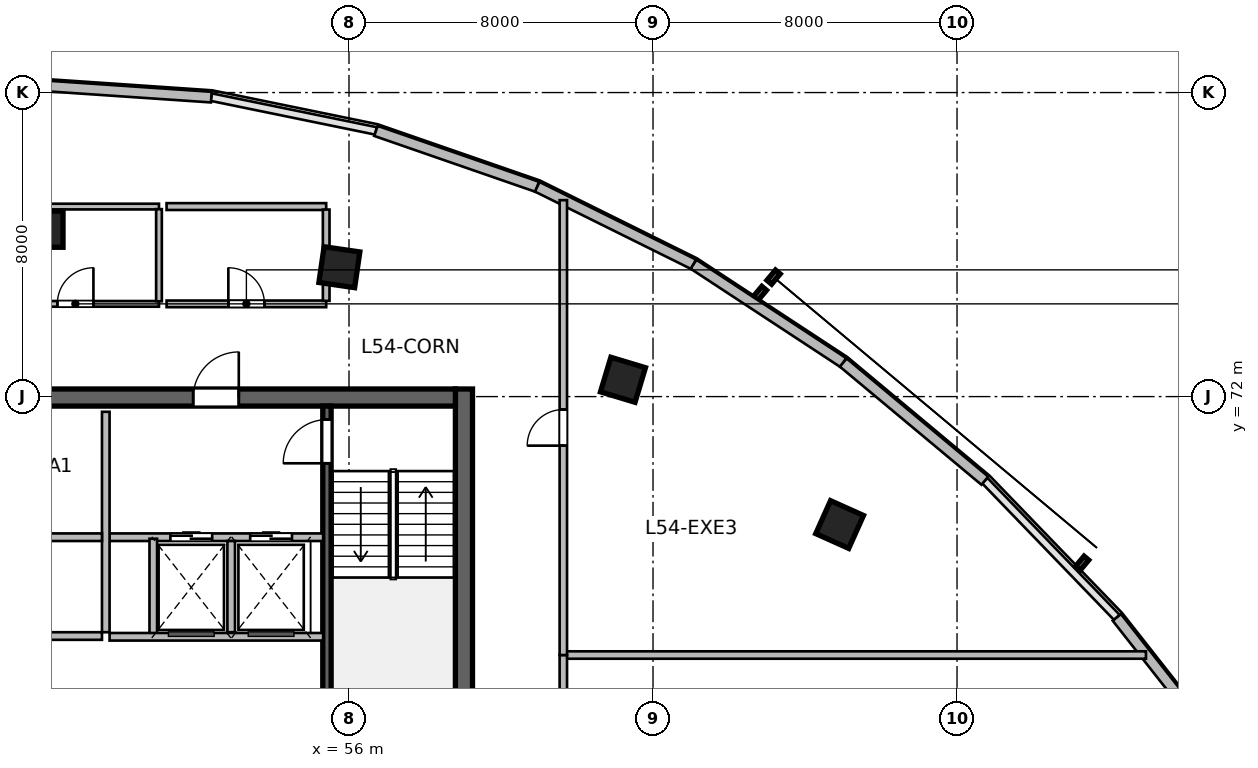
"""IFC4 building model, lengths in metres.
Left out: names, types, materials, properties, quantities, classifications, styles, units other than length and angle.
Written with IfcOpenShell. Run it as: python <this file> out.ifc"""

import sys

from ifc_helpers import new_model, si_unit, direction, frame, frame_2d, origin, origin_2d, place, context, subcontext, project, spatial, rectangle, extrude, source, transform, mapped, element, fill, save


model = new_model("IFC4")
c1 = context("Model", 3, precision=1e-05, world=origin(), true_north=direction((0.0, 1.0)))
c2 = subcontext(c1, "Body", "Model", "MODEL_VIEW")
j1 = project(units=[si_unit("LENGTHUNIT", "METRE"), si_unit("PLANEANGLEUNIT", "RADIAN")], contexts=[c1])
p1 = place(None, origin())
s1 = spatial("IfcSite", under=j1, at=p1, CompositionType="ELEMENT")
p2 = place(p1, origin())
s2 = spatial("IfcBuilding", under=s1, at=p2, CompositionType="ELEMENT")
p3 = place(p2, frame((0.0, 0.0, 223.5)))
s3 = spatial("IfcBuildingStorey", under=s2, at=p3, CompositionType="ELEMENT", Elevation=223.5)
m1 = source(origin(), c2, "Body", "SweptSolid", [
    extrude(rectangle(XDim=12.0, YDim=0.45, at=frame_2d((6.0, 0.0))), origin(), (0.0, 0.0, 1.0), 3.9),
])
p4 = place(p3, frame((59.025, 60.2, 0.0), z_axis=(0.0, 0.0, 1.0), x_axis=(0.0, 1.0, 0.0)))
e1 = element("IfcWall", 1, at=p4, inside=s3, PredefinedType="SHEAR", context=c2, shape_type="MappedRepresentation", body=[
    mapped(m1, transform((0.0, 0.0, 0.0), scale=1.0)),
])
m2 = source(origin(), c2, "Body", "SweptSolid", [
    extrude(rectangle(XDim=21.6, YDim=0.45, at=frame_2d((10.8, 0.0))), origin(), (0.0, 0.0, 1.0), 3.9),
])
p5 = place(p3, frame((37.2, 71.975, 0.0), z_axis=(0.0, 0.0, 1.0), x_axis=(1.0, 0.0, 0.0)))
e2 = element("IfcWall", 2, at=p5, inside=s3, PredefinedType="SHEAR", context=c2, shape_type="MappedRepresentation", body=[
    mapped(m2, transform((0.0, 0.0, 0.0), scale=1.0)),
])
p6 = place(p5, frame((1.2, 0.0, 0.0)))
e3 = element("IfcOpeningElement", 3, at=p6, cuts=e2, PredefinedType="OPENING", context=c2, shape_type="SweptSolid", body=[
    extrude(rectangle(XDim=0.9, YDim=2.1, at=frame_2d((0.45, 1.05))), frame((0.0, 0.235, 0.0), z_axis=(0.0, -1.0, 0.0), x_axis=(1.0, 0.0, 0.0)), (0.0, 0.0, 1.0), 0.47),
])
p7 = place(p5, frame((14.7, 0.0, 0.0)))
e4 = element("IfcOpeningElement", 4, at=p7, cuts=e2, PredefinedType="OPENING", context=c2, shape_type="SweptSolid", body=[
    extrude(rectangle(XDim=1.2, YDim=2.15, at=frame_2d((0.6, 1.075))), frame((0.0, 0.235, 0.0), z_axis=(0.0, -1.0, 0.0), x_axis=(1.0, 0.0, 0.0)), (0.0, 0.0, 1.0), 0.47),
])
p8 = place(p5, frame((4.15, 0.0, 0.0)))
e5 = element("IfcOpeningElement", 5, at=p8, cuts=e2, PredefinedType="OPENING", context=c2, shape_type="SweptSolid", body=[
    extrude(rectangle(XDim=1.3, YDim=2.15, at=frame_2d((0.65, 1.075))), frame((0.0, 0.235, 0.0), z_axis=(0.0, -1.0, 0.0), x_axis=(1.0, 0.0, 0.0)), (0.0, 0.0, 1.0), 0.47),
])
p9 = place(p5, frame((7.1, 0.0, 0.0)))
e6 = element("IfcOpeningElement", 6, at=p9, cuts=e2, PredefinedType="OPENING", context=c2, shape_type="SweptSolid", body=[
    extrude(rectangle(XDim=0.9, YDim=2.1, at=frame_2d((0.45, 1.05))), frame((0.0, 0.235, 0.0), z_axis=(0.0, -1.0, 0.0), x_axis=(1.0, 0.0, 0.0)), (0.0, 0.0, 1.0), 0.47),
])
m3 = source(origin(), c2, "Body", "SweptSolid", [
    extrude(rectangle(XDim=11.1, YDim=0.22, at=frame_2d((5.55, 0.0))), origin(), (0.0, 0.0, 1.0), 3.9),
])
p10 = place(p3, frame((55.42, 60.65, 0.0), z_axis=(0.0, 0.0, 1.0), x_axis=(0.0, 1.0, 0.0)))
e7 = element("IfcWall", 7, at=p10, inside=s3, PredefinedType="SHEAR", context=c2, shape_type="MappedRepresentation", body=[
    mapped(m3, transform((0.0, 0.0, 0.0), scale=1.0)),
])
p11 = place(p10, frame((9.595, 0.0, 0.0)))
e8 = element("IfcOpeningElement", 8, at=p11, cuts=e7, PredefinedType="OPENING", context=c2, shape_type="SweptSolid", body=[
    extrude(rectangle(XDim=1.15, YDim=2.15, at=frame_2d((0.575, 1.075))), frame((0.0, 0.12, 0.0), z_axis=(0.0, -1.0, 0.0), x_axis=(1.0, 0.0, 0.0)), (0.0, 0.0, 1.0), 0.24),
])
m4 = source(origin(), c2, "Body", "SweptSolid", [
    extrude(rectangle(XDim=0.95, YDim=0.95, at=origin_2d()), origin(), (0.0, 0.0, 1.0), 3.9),
])
for number, where, z_axis, x_axis in (
    (9, (48.0, 76.404, 0.0), (0.0, 0.0, 1.0), (0.0, 1.0, 0.0)),
    (10, (55.747, 75.404, 0.0), (0.0, 0.0, 1.0), (0.143, 0.99, 0.0)),
    (11, (63.209, 72.442, 0.0), (0.0, 0.0, 1.0), (0.289, 0.957, 0.0)),
    (12, (68.91, 68.633, 0.0), (0.0, 0.0, 1.0), (0.409, 0.912, 0.0)),
):
    element("IfcColumn", number, at=place(p3, frame(where, z_axis=z_axis, x_axis=x_axis)), inside=s3, PredefinedType="COLUMN", context=c2, shape_type="MappedRepresentation", body=[
        mapped(m4, transform((0.0, 0.0, 0.0), scale=1.0)),
    ])
m5 = source(origin(), c2, "Body", "SweptSolid", [
    extrude(rectangle(XDim=4.387, YDim=0.28, at=frame_2d((2.193, 0.0))), origin(), (0.0, 0.0, 1.0), 3.64),
])
p12 = place(p3, frame((48.0, 80.177, 0.0), z_axis=(0.0, 0.0, 1.0), x_axis=(0.997703650546, -0.06773053733, 0.0)))
e13 = element("IfcWall", 13, at=p12, inside=s3, PredefinedType="SOLIDWALL", context=c2, shape_type="MappedRepresentation", body=[
    mapped(m5, transform((0.0, 0.0, 0.0), scale=1.0)),
])
m6 = source(origin(), c2, "Body", "SweptSolid", [
    extrude(rectangle(XDim=4.492, YDim=0.28, at=frame_2d((2.246, 0.0))), origin(), (0.0, 0.0, 1.0), 3.64),
])
p13 = place(p3, frame((56.709, 78.991, 0.0), z_axis=(0.0, 0.0, 1.0), x_axis=(0.944872297412, -0.32743906545, 0.0)))
e14 = element("IfcWall", 14, at=p13, inside=s3, PredefinedType="SOLIDWALL", context=c2, shape_type="MappedRepresentation", body=[
    mapped(m6, transform((0.0, 0.0, 0.0), scale=1.0)),
])
m7 = source(origin(), c2, "Body", "SweptSolid", [
    extrude(rectangle(XDim=4.59, YDim=0.28, at=frame_2d((2.295, 0.0))), origin(), (0.0, 0.0, 1.0), 3.64),
])
p14 = place(p3, frame((60.954, 77.52, 0.0), z_axis=(0.0, 0.0, 1.0), x_axis=(0.895974834987, -0.444104824418, 0.0)))
e15 = element("IfcWall", 15, at=p14, inside=s3, PredefinedType="SOLIDWALL", context=c2, shape_type="MappedRepresentation", body=[
    mapped(m7, transform((0.0, 0.0, 0.0), scale=1.0)),
])
m8 = source(origin(), c2, "Body", "SweptSolid", [
    extrude(rectangle(XDim=4.713, YDim=0.28, at=frame_2d((2.356, 0.0))), origin(), (0.0, 0.0, 1.0), 3.64),
])
p15 = place(p3, frame((65.066, 75.482, 0.0), z_axis=(0.0, 0.0, 1.0), x_axis=(0.835974386457, -0.548768462275, 0.0)))
e16 = element("IfcWall", 16, at=p15, inside=s3, PredefinedType="SOLIDWALL", context=c2, shape_type="MappedRepresentation", body=[
    mapped(m8, transform((0.0, 0.0, 0.0), scale=1.0)),
])
m9 = source(origin(), c2, "Body", "SweptSolid", [
    extrude(rectangle(XDim=4.852, YDim=0.28, at=frame_2d((2.426, 0.0))), origin(), (0.0, 0.0, 1.0), 3.64),
])
p16 = place(p3, frame((69.006, 72.896, 0.0), z_axis=(0.0, 0.0, 1.0), x_axis=(0.767936605821, -0.640525853843, 0.0)))
e17 = element("IfcWall", 17, at=p16, inside=s3, PredefinedType="SOLIDWALL", context=c2, shape_type="MappedRepresentation", body=[
    mapped(m9, transform((0.0, 0.0, 0.0), scale=1.0)),
])
m10 = source(origin(), c2, "Body", "SweptSolid", [
    extrude(rectangle(XDim=5.153, YDim=0.28, at=frame_2d((2.577, 0.0))), origin(), (0.0, 0.0, 1.0), 3.64),
])
p17 = place(p3, frame((76.205, 66.19, 0.0), z_axis=(0.0, 0.0, 1.0), x_axis=(0.618179283891, -0.786037132054, 0.0)))
e18 = element("IfcWall", 18, at=p17, inside=s3, PredefinedType="SOLIDWALL", context=c2, shape_type="MappedRepresentation", body=[
    mapped(m10, transform((0.0, 0.0, 0.0), scale=1.0)),
])
m11 = source(origin(), c2, "Body", "SweptSolid", [
    extrude(rectangle(XDim=5.62, YDim=0.2, at=frame_2d((2.81, 0.0))), origin(), (0.0, 0.0, 1.0), 3.64),
])
p18 = place(p3, frame((49.7, 68.3, 0.0), z_axis=(0.0, 0.0, 1.0), x_axis=(1.0, 0.0, 0.0)))
e19 = element("IfcWall", 19, at=p18, inside=s3, PredefinedType="SOLIDWALL", context=c2, shape_type="MappedRepresentation", body=[
    mapped(m11, transform((0.0, 0.0, 0.0), scale=1.0)),
])
p19 = place(p18, frame((1.6, 0.0, 0.0)))
e20 = element("IfcOpeningElement", 20, at=p19, cuts=e19, PredefinedType="OPENING", context=c2, shape_type="SweptSolid", body=[
    extrude(rectangle(XDim=1.1, YDim=2.15, at=frame_2d((0.55, 1.075))), frame((0.0, 0.11, 0.0), z_axis=(0.0, -1.0, 0.0), x_axis=(1.0, 0.0, 0.0)), (0.0, 0.0, 1.0), 0.22),
])
p20 = place(p18, frame((3.7, 0.0, 0.0)))
e21 = element("IfcOpeningElement", 21, at=p20, cuts=e19, PredefinedType="OPENING", context=c2, shape_type="SweptSolid", body=[
    extrude(rectangle(XDim=1.1, YDim=2.15, at=frame_2d((0.55, 1.075))), frame((0.0, 0.11, 0.0), z_axis=(0.0, -1.0, 0.0), x_axis=(1.0, 0.0, 0.0)), (0.0, 0.0, 1.0), 0.22),
])
m12 = source(origin(), c2, "Body", "SweptSolid", [
    extrude(rectangle(XDim=5.8, YDim=0.2, at=frame_2d((2.9, 0.0))), origin(), (0.0, 0.0, 1.0), 3.64),
])
p21 = place(p3, frame((49.6, 65.8, 0.0), z_axis=(0.0, 0.0, 1.0), x_axis=(0.0, 1.0, 0.0)))
e22 = element("IfcWall", 22, at=p21, inside=s3, PredefinedType="SOLIDWALL", context=c2, shape_type="MappedRepresentation", body=[
    mapped(m12, transform((0.0, 0.0, 0.0), scale=1.0)),
])
m13 = source(origin(), c2, "Body", "SweptSolid", [
    extrude(rectangle(XDim=2.58, YDim=0.2, at=frame_2d((1.29, 0.0))), origin(), (0.0, 0.0, 1.0), 3.64),
])
p22 = place(p3, frame((50.85, 65.68, 0.0), z_axis=(0.0, 0.0, 1.0), x_axis=(0.0, 1.0, 0.0)))
e23 = element("IfcWall", 23, at=p22, inside=s3, PredefinedType="SOLIDWALL", context=c2, shape_type="MappedRepresentation", body=[
    mapped(m13, transform((0.0, 0.0, 0.0), scale=1.0)),
])
m14 = source(origin(), c2, "Body", "SweptSolid", [
    extrude(rectangle(XDim=2.4, YDim=0.2, at=frame_2d((1.2, 0.0))), origin(), (0.0, 0.0, 1.0), 3.64),
])
p23 = place(p3, frame((52.9, 65.8, 0.0), z_axis=(0.0, 0.0, 1.0), x_axis=(0.0, 1.0, 0.0)))
e24 = element("IfcWall", 24, at=p23, inside=s3, PredefinedType="SOLIDWALL", context=c2, shape_type="MappedRepresentation", body=[
    mapped(m14, transform((0.0, 0.0, 0.0), scale=1.0)),
])
p24 = place(p3, frame((49.7, 65.68, 0.0), z_axis=(0.0, 0.0, 1.0), x_axis=(1.0, 0.0, 0.0)))
e25 = element("IfcWall", 25, at=p24, inside=s3, PredefinedType="SOLIDWALL", context=c2, shape_type="MappedRepresentation", body=[
    mapped(m11, transform((0.0, 0.0, 0.0), scale=1.0)),
])
m15 = source(origin(), c2, "Body", "SweptSolid", [
    extrude(rectangle(XDim=8.8, YDim=0.2, at=frame_2d((4.4, 0.0))), origin(), (0.0, 0.0, 1.0), 3.64),
])
p25 = place(p3, frame((40.7, 68.3, 0.0), z_axis=(0.0, 0.0, 1.0), x_axis=(1.0, 0.0, 0.0)))
e26 = element("IfcWall", 26, at=p25, inside=s3, PredefinedType="SOLIDWALL", context=c2, shape_type="MappedRepresentation", body=[
    mapped(m15, transform((0.0, 0.0, 0.0), scale=1.0)),
])
p26 = place(p3, frame((40.7, 65.7, 0.0), z_axis=(0.0, 0.0, 1.0), x_axis=(1.0, 0.0, 0.0)))
e27 = element("IfcWall", 27, at=p26, inside=s3, PredefinedType="SOLIDWALL", context=c2, shape_type="MappedRepresentation", body=[
    mapped(m15, transform((0.0, 0.0, 0.0), scale=1.0)),
])
p27 = place(p26, frame((3.8, 0.0, 0.0)))
e28 = element("IfcOpeningElement", 28, at=p27, cuts=e27, PredefinedType="OPENING", context=c2, shape_type="SweptSolid", body=[
    extrude(rectangle(XDim=0.95, YDim=2.15, at=frame_2d((0.475, 1.075))), frame((0.0, 0.11, 0.0), z_axis=(0.0, -1.0, 0.0), x_axis=(1.0, 0.0, 0.0)), (0.0, 0.0, 1.0), 0.22),
])
m16 = source(origin(), c2, "Body", "SweptSolid", [
    extrude(rectangle(XDim=4.4, YDim=0.15, at=frame_2d((2.2, 0.0))), origin(), (0.0, 0.0, 1.0), 3.64),
])
p28 = place(p3, frame((46.6, 74.44, 0.0), z_axis=(0.0, 0.0, 1.0), x_axis=(1.0, 0.0, 0.0)))
e29 = element("IfcWall", 29, at=p28, inside=s3, PredefinedType="PARTITIONING", context=c2, shape_type="MappedRepresentation", body=[
    mapped(m16, transform((0.0, 0.0, 0.0), scale=1.0)),
])
p29 = place(p28, frame((1.725, 0.0, 0.0)))
e30 = element("IfcOpeningElement", 30, at=p29, cuts=e29, PredefinedType="OPENING", context=c2, shape_type="SweptSolid", body=[
    extrude(rectangle(XDim=0.95, YDim=2.1, at=frame_2d((0.475, 1.05))), frame((0.0, 0.085, 0.0), z_axis=(0.0, -1.0, 0.0), x_axis=(1.0, 0.0, 0.0)), (0.0, 0.0, 1.0), 0.17),
])
p30 = place(p3, frame((46.6, 77.0, 0.0), z_axis=(0.0, 0.0, 1.0), x_axis=(1.0, 0.0, 0.0)))
e31 = element("IfcWall", 31, at=p30, inside=s3, PredefinedType="PARTITIONING", context=c2, shape_type="MappedRepresentation", body=[
    mapped(m16, transform((0.0, 0.0, 0.0), scale=1.0)),
])
m17 = source(origin(), c2, "Body", "SweptSolid", [
    extrude(rectangle(XDim=2.425, YDim=0.15, at=frame_2d((1.212, 0.0))), origin(), (0.0, 0.0, 1.0), 3.64),
])
p31 = place(p3, frame((51.0, 74.508, 0.0), z_axis=(0.0, 0.0, 1.0), x_axis=(0.0, 1.0, 0.0)))
e32 = element("IfcWall", 32, at=p31, inside=s3, PredefinedType="PARTITIONING", context=c2, shape_type="MappedRepresentation", body=[
    mapped(m17, transform((0.0, 0.0, 0.0), scale=1.0)),
])
m18 = source(origin(), c2, "Body", "SweptSolid", [
    extrude(rectangle(XDim=4.2, YDim=0.175, at=frame_2d((2.1, 0.0))), origin(), (0.0, 0.0, 1.0), 3.64),
])
p32 = place(p3, frame((51.2, 74.44, 0.0), z_axis=(0.0, 0.0, 1.0), x_axis=(1.0, 0.0, 0.0)))
e33 = element("IfcWall", 33, at=p32, inside=s3, PredefinedType="PARTITIONING", context=c2, shape_type="MappedRepresentation", body=[
    mapped(m18, transform((0.0, 0.0, 0.0), scale=1.0)),
])
p33 = place(p32, frame((1.625, 0.0, 0.0)))
e34 = element("IfcOpeningElement", 34, at=p33, cuts=e33, PredefinedType="OPENING", context=c2, shape_type="SweptSolid", body=[
    extrude(rectangle(XDim=0.95, YDim=2.12, at=frame_2d((0.475, 1.06))), frame((0.0, 0.098, 0.0), z_axis=(0.0, -1.0, 0.0), x_axis=(1.0, 0.0, 0.0)), (0.0, 0.0, 1.0), 0.195),
])
m19 = source(origin(), c2, "Body", "SweptSolid", [
    extrude(rectangle(XDim=4.2, YDim=0.18, at=frame_2d((2.1, 0.0))), origin(), (0.0, 0.0, 1.0), 3.64),
])
p34 = place(p3, frame((51.2, 77.0, 0.0), z_axis=(0.0, 0.0, 1.0), x_axis=(1.0, 0.0, 0.0)))
e35 = element("IfcWall", 35, at=p34, inside=s3, PredefinedType="PLUMBINGWALL", context=c2, shape_type="MappedRepresentation", body=[
    mapped(m19, transform((0.0, 0.0, 0.0), scale=1.0)),
])
m20 = source(origin(), c2, "Body", "SweptSolid", [
    extrude(rectangle(XDim=2.403, YDim=0.175, at=frame_2d((1.201, 0.0))), origin(), (0.0, 0.0, 1.0), 3.64),
])
p35 = place(p3, frame((55.4, 74.519, 0.0), z_axis=(0.0, 0.0, 1.0), x_axis=(0.0, 1.0, 0.0)))
e36 = element("IfcWall", 36, at=p35, inside=s3, PredefinedType="PARTITIONING", context=c2, shape_type="MappedRepresentation", body=[
    mapped(m20, transform((0.0, 0.0, 0.0), scale=1.0)),
])
m21 = source(origin(), c2, "Body", "SweptSolid", [
    extrude(rectangle(XDim=15.332, YDim=0.195, at=frame_2d((7.666, 0.0))), origin(), (0.0, 0.0, 1.0), 3.64),
])
p36 = place(p3, frame((61.64, 65.2, 0.0), z_axis=(0.0, 0.0, 1.0), x_axis=(1.0, 0.0, 0.0)))
e37 = element("IfcWall", 37, at=p36, inside=s3, PredefinedType="PARTITIONING", context=c2, shape_type="MappedRepresentation", body=[
    mapped(m21, transform((0.0, 0.0, 0.0), scale=1.0)),
])
m22 = source(origin(), c2, "Body", "SweptSolid", [
    extrude(rectangle(XDim=4.0, YDim=0.195, at=frame_2d((2.0, 0.0))), origin(), (0.0, 0.0, 1.0), 3.64),
])
p37 = place(p3, frame((61.64, 61.2, 0.0), z_axis=(0.0, 0.0, 1.0), x_axis=(0.0, 1.0, 0.0)))
e38 = element("IfcWall", 38, at=p37, inside=s3, PredefinedType="PARTITIONING", context=c2, shape_type="MappedRepresentation", body=[
    mapped(m22, transform((0.0, 0.0, 0.0), scale=1.0)),
])
p38 = place(p37, frame((1.045, 0.0, 0.0)))
e39 = element("IfcOpeningElement", 39, at=p38, cuts=e38, PredefinedType="OPENING", context=c2, shape_type="SweptSolid", body=[
    extrude(rectangle(XDim=0.95, YDim=2.1, at=frame_2d((0.475, 1.05))), frame((0.0, 0.107, 0.0), z_axis=(0.0, -1.0, 0.0), x_axis=(1.0, 0.0, 0.0)), (0.0, 0.0, 1.0), 0.215),
])
m23 = source(origin(), c2, "Body", "SweptSolid", [
    extrude(rectangle(XDim=11.969, YDim=0.195, at=frame_2d((5.984, 0.0))), origin(), (0.0, 0.0, 1.0), 3.64),
])
p39 = place(p3, frame((61.64, 65.2, 0.0), z_axis=(0.0, 0.0, 1.0), x_axis=(0.0, 1.0, 0.0)))
e40 = element("IfcWall", 40, at=p39, inside=s3, PredefinedType="PARTITIONING", context=c2, shape_type="MappedRepresentation", body=[
    mapped(m23, transform((0.0, 0.0, 0.0), scale=1.0)),
])
p40 = place(p39, frame((5.51, 0.0, 0.0)))
e41 = element("IfcOpeningElement", 41, at=p40, cuts=e40, PredefinedType="OPENING", context=c2, shape_type="SweptSolid", body=[
    extrude(rectangle(XDim=0.95, YDim=2.1, at=frame_2d((0.475, 1.05))), frame((0.0, 0.107, 0.0), z_axis=(0.0, -1.0, 0.0), x_axis=(1.0, 0.0, 0.0)), (0.0, 0.0, 1.0), 0.215),
])
m24 = source(origin(), c2, "Body", "SweptSolid", [
    extrude(rectangle(XDim=1.15, YDim=2.15, at=frame_2d((0.575, 1.075))), frame((0.0, 0.025, 0.0), z_axis=(0.0, -1.0, 0.0), x_axis=(1.0, 0.0, 0.0)), (0.0, 0.0, 1.0), 0.05),
])
p41 = place(p11, origin())
e42 = element("IfcDoor", 42, at=p41, inside=s3, OperationType="SINGLE_SWING_LEFT", PredefinedType="DOOR", context=c2, shape_type="MappedRepresentation", body=[
    mapped(m24, transform((0.0, 0.0, 0.0), scale=1.0)),
])
fill(e8, e42)
m25 = source(origin(), c2, "Body", "SweptSolid", [
    extrude(rectangle(XDim=1.2, YDim=2.15, at=frame_2d((0.6, 1.075))), frame((0.0, 0.025, 0.0), z_axis=(0.0, -1.0, 0.0), x_axis=(1.0, 0.0, 0.0)), (0.0, 0.0, 1.0), 0.05),
])
p42 = place(p7, origin())
e43 = element("IfcDoor", 43, at=p42, inside=s3, OperationType="SINGLE_SWING_RIGHT", PredefinedType="DOOR", context=c2, shape_type="MappedRepresentation", body=[
    mapped(m25, transform((0.0, 0.0, 0.0), scale=1.0)),
])
fill(e4, e43)
m26 = source(origin(), c2, "Body", "SweptSolid", [
    extrude(rectangle(XDim=1.1, YDim=2.15, at=frame_2d((0.55, 1.075))), frame((0.0, 0.025, 0.0), z_axis=(0.0, -1.0, 0.0), x_axis=(1.0, 0.0, 0.0)), (0.0, 0.0, 1.0), 0.05),
])
p43 = place(p19, origin())
e44 = element("IfcDoor", 44, at=p43, inside=s3, OperationType="DOUBLE_DOOR_SLIDING", PredefinedType="DOOR", context=c2, shape_type="MappedRepresentation", body=[
    mapped(m26, transform((0.0, 0.0, 0.0), scale=1.0)),
])
fill(e20, e44)
p44 = place(p20, origin())
e45 = element("IfcDoor", 45, at=p44, inside=s3, OperationType="DOUBLE_DOOR_SLIDING", PredefinedType="DOOR", context=c2, shape_type="MappedRepresentation", body=[
    mapped(m26, transform((0.0, 0.0, 0.0), scale=1.0)),
])
fill(e21, e45)
m27 = source(origin(), c2, "Body", "SweptSolid", [
    extrude(rectangle(XDim=0.95, YDim=2.1, at=frame_2d((0.475, 1.05))), frame((0.0, 0.025, 0.0), z_axis=(0.0, -1.0, 0.0), x_axis=(1.0, 0.0, 0.0)), (0.0, 0.0, 1.0), 0.05),
])
p45 = place(p29, origin())
e46 = element("IfcDoor", 46, at=p45, inside=s3, OperationType="SINGLE_SWING_RIGHT", PredefinedType="DOOR", context=c2, shape_type="MappedRepresentation", body=[
    mapped(m27, transform((0.0, 0.0, 0.0), scale=1.0)),
])
fill(e30, e46)
m28 = source(origin(), c2, "Body", "SweptSolid", [
    extrude(rectangle(XDim=0.95, YDim=2.12, at=frame_2d((0.475, 1.06))), frame((0.0, 0.025, 0.0), z_axis=(0.0, -1.0, 0.0), x_axis=(1.0, 0.0, 0.0)), (0.0, 0.0, 1.0), 0.05),
])
p46 = place(p33, origin())
e47 = element("IfcDoor", 47, at=p46, inside=s3, OperationType="SINGLE_SWING_LEFT", PredefinedType="DOOR", context=c2, shape_type="MappedRepresentation", body=[
    mapped(m28, transform((0.0, 0.0, 0.0), scale=1.0)),
])
fill(e34, e47)
p47 = place(p40, origin())
e48 = element("IfcDoor", 48, at=p47, inside=s3, OperationType="SINGLE_SWING_LEFT", PredefinedType="DOOR", context=c2, shape_type="MappedRepresentation", body=[
    mapped(m27, transform((0.0, 0.0, 0.0), scale=1.0)),
])
fill(e41, e48)
save(model, sys.argv[1])
